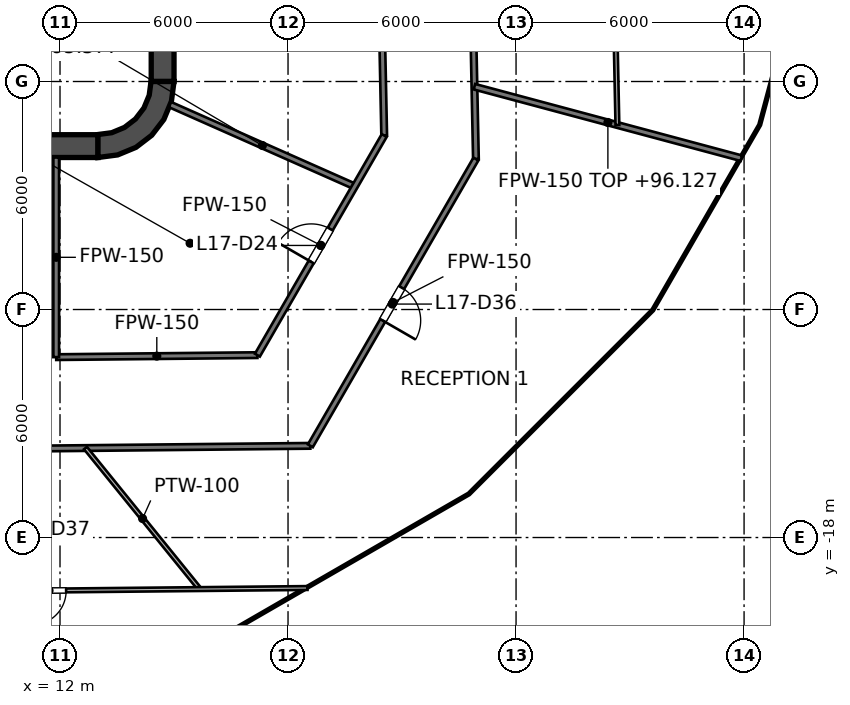
"""IFC4 building model, lengths in metres.
Left out: names, types, materials, properties, quantities, classifications, styles, units other than length and angle.
Written with IfcOpenShell. Run it as: python <this file> out.ifc"""

import sys

from ifc_helpers import new_model, si_unit, direction, frame, frame_2d, origin, place, context, subcontext, project, spatial, polyline, rectangle, outline, extrude, element, fill, save


model = new_model("IFC4")
c1 = context("Model", 3, precision=1e-05, world=origin(), true_north=direction((0.0, 1.0)))
c2 = subcontext(c1, "Body", "Model", "MODEL_VIEW")
j1 = project(units=[si_unit("LENGTHUNIT", "METRE"), si_unit("PLANEANGLEUNIT", "RADIAN")], contexts=[c1])
p1 = place(None, origin())
s1 = spatial("IfcSite", under=j1, at=p1, CompositionType="ELEMENT")
p2 = place(p1, origin())
s2 = spatial("IfcBuilding", under=s1, at=p2, CompositionType="ELEMENT")
p3 = place(p2, frame((0.0, 0.0, 92.4)))
s3 = spatial("IfcBuildingStorey", under=s2, at=p3, CompositionType="ELEMENT", Elevation=92.4)
p4 = place(p3, frame((-13.0, -7.7, 0.0), z_axis=(0.0, 0.0, 1.0), x_axis=(1.0, 0.0, 0.0)))
e1 = element("IfcWall", 1, at=p4, inside=s3, PredefinedType="SHEAR", context=c2, shape_type="SweptSolid", body=[
    extrude(rectangle(XDim=26.0, YDim=0.6, at=frame_2d((13.0, 0.0))), origin(), (0.0, 0.0, 1.0), 4.2),
])
p5 = place(p4, frame((1.7, 0.0, 0.0)))
e2 = element("IfcOpeningElement", 2, at=p5, cuts=e1, PredefinedType="OPENING", context=c2, shape_type="SweptSolid", body=[
    extrude(rectangle(XDim=1.8, YDim=2.1, at=frame_2d((0.9, 1.05))), frame((0.0, 0.3, 0.0), z_axis=(0.0, -1.0, 0.0), x_axis=(1.0, 0.0, 0.0)), (0.0, 0.0, 1.0), 0.6),
])
p6 = place(p4, frame((22.5, 0.0, 0.0)))
e3 = element("IfcOpeningElement", 3, at=p6, cuts=e1, PredefinedType="OPENING", context=c2, shape_type="SweptSolid", body=[
    extrude(rectangle(XDim=1.8, YDim=2.1, at=frame_2d((0.9, 1.05))), frame((0.0, 0.3, 0.0), z_axis=(0.0, -1.0, 0.0), x_axis=(1.0, 0.0, 0.0)), (0.0, 0.0, 1.0), 0.6),
])
p7 = place(p3, frame((14.7, -6.0, 0.0), z_axis=(0.0, 0.0, 1.0), x_axis=(0.0, 1.0, 0.0)))
e4 = element("IfcWall", 4, at=p7, inside=s3, PredefinedType="SHEAR", context=c2, shape_type="SweptSolid", body=[
    extrude(rectangle(XDim=12.0, YDim=0.6, at=frame_2d((6.0, 0.0))), origin(), (0.0, 0.0, 1.0), 4.2),
])
p8 = place(p3, origin())
e5 = element("IfcWall", 5, at=p8, inside=s3, PredefinedType="SHEAR", context=c2, shape_type="SweptSolid", body=[
    extrude(outline(polyline([(15.0, -6.0), (14.395, -6.0), (14.347, -6.361), (14.208, -6.698), (13.986, -6.986), (13.698, -7.208), (13.361, -7.347), (13.0, -7.395), (13.0, -8.0), (13.518, -7.932), (14.0, -7.732), (14.414, -7.414), (14.732, -7.0), (14.932, -6.518), (15.0, -6.0)])), origin(), (0.0, 0.0, 1.0), 4.2),
])
p9 = place(p3, frame((11.8, -7.4, 0.0), z_axis=(0.0, 0.0, 1.0), x_axis=(0.0, 1.0, 0.0)))
e6 = element("IfcWall", 6, at=p9, inside=s3, PredefinedType="SOLIDWALL", context=c2, shape_type="SweptSolid", body=[
    extrude(rectangle(XDim=14.8, YDim=0.4, at=frame_2d((7.4, 0.0))), origin(), (0.0, 0.0, 1.0), 3.9),
])
p10 = place(p9, frame((11.2, 0.0, 0.0)))
e7 = element("IfcOpeningElement", 7, at=p10, cuts=e6, PredefinedType="OPENING", context=c2, shape_type="SweptSolid", body=[
    extrude(rectangle(XDim=1.1, YDim=2.1, at=frame_2d((0.55, 1.05))), frame((0.0, 0.2, 0.0), z_axis=(0.0, -1.0, 0.0), x_axis=(1.0, 0.0, 0.0)), (0.0, 0.0, 1.0), 0.4),
])
p11 = place(p9, frame((8.3, 0.0, 0.0)))
e8 = element("IfcOpeningElement", 8, at=p11, cuts=e6, PredefinedType="OPENING", context=c2, shape_type="SweptSolid", body=[
    extrude(rectangle(XDim=1.1, YDim=2.1, at=frame_2d((0.55, 1.05))), frame((0.0, 0.2, 0.0), z_axis=(0.0, -1.0, 0.0), x_axis=(1.0, 0.0, 0.0)), (0.0, 0.0, 1.0), 0.4),
])
p12 = place(p9, frame((5.4, 0.0, 0.0)))
e9 = element("IfcOpeningElement", 9, at=p12, cuts=e6, PredefinedType="OPENING", context=c2, shape_type="SweptSolid", body=[
    extrude(rectangle(XDim=1.1, YDim=2.1, at=frame_2d((0.55, 1.05))), frame((0.0, 0.2, 0.0), z_axis=(0.0, -1.0, 0.0), x_axis=(1.0, 0.0, 0.0)), (0.0, 0.0, 1.0), 0.4),
])
p13 = place(p9, frame((13.552, 0.0, 0.0)))
e10 = element("IfcOpeningElement", 10, at=p13, cuts=e6, PredefinedType="OPENING", context=c2, shape_type="SweptSolid", body=[
    extrude(rectangle(XDim=0.9, YDim=2.1, at=frame_2d((0.45, 1.05))), frame((0.0, 0.2, 0.0), z_axis=(0.0, -1.0, 0.0), x_axis=(1.0, 0.0, 0.0)), (0.0, 0.0, 1.0), 0.4),
])
p14 = place(p9, frame((0.347, 0.0, 0.0)))
e11 = element("IfcOpeningElement", 11, at=p14, cuts=e6, PredefinedType="OPENING", context=c2, shape_type="SweptSolid", body=[
    extrude(rectangle(XDim=0.9, YDim=2.1, at=frame_2d((0.45, 1.05))), frame((0.0, 0.2, 0.0), z_axis=(0.0, -1.0, 0.0), x_axis=(1.0, 0.0, 0.0)), (0.0, 0.0, 1.0), 0.4),
])
e12 = element("IfcWall", 12, at=p8, inside=s3, PredefinedType="SOLIDWALL", context=c2, shape_type="SweptSolid", body=[
    extrude(outline(polyline([(12.0, -5.675), (12.0, -5.925), (14.15, -5.925), (14.4, -5.925), (14.4, -5.675), (14.4, -3.025), (14.4, -2.775), (14.4, -0.125), (14.4, 0.125), (14.4, 2.775), (14.4, 3.025), (14.4, 5.675), (14.4, 5.925), (14.15, 5.925), (12.0, 5.925), (12.0, 5.675), (14.15, 5.675), (14.15, 3.025), (12.0, 3.025), (12.0, 2.775), (14.15, 2.775), (14.15, 0.125), (12.0, 0.125), (12.0, -0.125), (14.15, -0.125), (14.15, -2.775), (12.0, -2.775), (12.0, -3.025), (14.15, -3.025), (14.15, -5.675), (12.0, -5.675)])), origin(), (0.0, 0.0, 1.0), 3.9),
])
p15 = place(p3, frame((20.167, 10.213, 0.0), z_axis=(0.0, 0.0, 1.0), x_axis=(0.020610894613, -0.999787572949, 0.0)))
e13 = element("IfcWall", 13, at=p15, inside=s3, PredefinedType="PARTITIONING", context=c2, shape_type="SweptSolid", body=[
    extrude(rectangle(XDim=17.637, YDim=0.15, at=frame_2d((8.819, 0.0))), origin(), (0.0, 0.0, 1.0), 2.968),
])
p16 = place(p15, frame((10.508, 0.0, 0.0)))
e14 = element("IfcOpeningElement", 14, at=p16, cuts=e13, PredefinedType="OPENING", context=c2, shape_type="SweptSolid", body=[
    extrude(rectangle(XDim=1.0, YDim=2.1, at=frame_2d((0.5, 1.05))), frame((0.0, 0.075, 0.0), z_axis=(0.0, -1.0, 0.0), x_axis=(1.0, 0.0, 0.0)), (0.0, 0.0, 1.0), 0.15),
])
p17 = place(p15, frame((5.09, 0.0, 0.0)))
e15 = element("IfcOpeningElement", 15, at=p17, cuts=e13, PredefinedType="OPENING", context=c2, shape_type="SweptSolid", body=[
    extrude(rectangle(XDim=1.0, YDim=2.1, at=frame_2d((0.5, 1.05))), frame((0.0, 0.075, 0.0), z_axis=(0.0, -1.0, 0.0), x_axis=(1.0, 0.0, 0.0)), (0.0, 0.0, 1.0), 0.15),
])
p18 = place(p3, frame((22.539, 11.615, 0.0), z_axis=(0.0, 0.0, 1.0), x_axis=(0.020601506683, -0.99978776644, 0.0)))
e16 = element("IfcWall", 16, at=p18, inside=s3, PredefinedType="PARTITIONING", context=c2, shape_type="SweptSolid", body=[
    extrude(rectangle(XDim=19.66, YDim=0.15, at=frame_2d((9.83, 0.0))), origin(), (0.0, 0.0, 1.0), 2.968),
])
p19 = place(p18, frame((13.54, 0.0, 0.0)))
e17 = element("IfcOpeningElement", 17, at=p19, cuts=e16, PredefinedType="OPENING", context=c2, shape_type="SweptSolid", body=[
    extrude(rectangle(XDim=1.0, YDim=2.1, at=frame_2d((0.5, 1.05))), frame((0.0, 0.075, 0.0), z_axis=(0.0, -1.0, 0.0), x_axis=(1.0, 0.0, 0.0)), (0.0, 0.0, 1.0), 0.15),
])
p20 = place(p18, frame((9.23, 0.0, 0.0)))
e18 = element("IfcOpeningElement", 18, at=p20, cuts=e16, PredefinedType="OPENING", context=c2, shape_type="SweptSolid", body=[
    extrude(rectangle(XDim=1.0, YDim=2.1, at=frame_2d((0.5, 1.05))), frame((0.0, 0.075, 0.0), z_axis=(0.0, -1.0, 0.0), x_axis=(1.0, 0.0, 0.0)), (0.0, 0.0, 1.0), 0.15),
])
p21 = place(p3, frame((14.895, -6.607, 0.0), z_axis=(0.0, 0.0, 1.0), x_axis=(0.914233271379, -0.405188259337, 0.0)))
e19 = element("IfcWall", 19, at=p21, inside=s3, PredefinedType="PARTITIONING", context=c2, shape_type="SweptSolid", body=[
    extrude(rectangle(XDim=5.317, YDim=0.15, at=frame_2d((2.659, 0.0))), origin(), (0.0, 0.0, 1.0), 2.977),
])
p22 = place(p3, frame((22.905, -6.137, 0.0), z_axis=(0.0, 0.0, 1.0), x_axis=(0.965915974273, -0.258855810529, 0.0)))
e20 = element("IfcWall", 20, at=p22, inside=s3, PredefinedType="PARTITIONING", context=c2, shape_type="SweptSolid", body=[
    extrude(rectangle(XDim=7.271, YDim=0.15, at=frame_2d((3.635, 0.0))), origin(), (0.0, 0.0, 1.0), 3.727),
])
p23 = place(p3, frame((-14.534, -15.916, 0.0), z_axis=(0.0, 0.0, 1.0), x_axis=(0.999950930262, 0.009906415532, 0.0)))
e21 = element("IfcWall", 21, at=p23, inside=s3, PredefinedType="PARTITIONING", context=c2, shape_type="SweptSolid", body=[
    extrude(rectangle(XDim=33.123, YDim=0.15, at=frame_2d((16.561, 0.0))), origin(), (0.0, 0.0, 1.0), 2.968),
])
p24 = place(p23, frame((22.477, 0.0, 0.0)))
e22 = element("IfcOpeningElement", 22, at=p24, cuts=e21, PredefinedType="OPENING", context=c2, shape_type="SweptSolid", body=[
    extrude(rectangle(XDim=1.0, YDim=2.1, at=frame_2d((0.5, 1.05))), frame((0.0, 0.075, 0.0), z_axis=(0.0, -1.0, 0.0), x_axis=(1.0, 0.0, 0.0)), (0.0, 0.0, 1.0), 0.15),
])
p25 = place(p23, frame((7.723, 0.0, 0.0)))
e23 = element("IfcOpeningElement", 23, at=p25, cuts=e21, PredefinedType="OPENING", context=c2, shape_type="SweptSolid", body=[
    extrude(rectangle(XDim=1.0, YDim=2.1, at=frame_2d((0.5, 1.05))), frame((0.0, 0.075, 0.0), z_axis=(0.0, -1.0, 0.0), x_axis=(1.0, 0.0, 0.0)), (0.0, 0.0, 1.0), 0.15),
])
p26 = place(p23, frame((16.111, 0.0, 0.0)))
e24 = element("IfcOpeningElement", 24, at=p26, cuts=e21, PredefinedType="OPENING", context=c2, shape_type="SweptSolid", body=[
    extrude(rectangle(XDim=1.0, YDim=2.1, at=frame_2d((0.5, 1.05))), frame((0.0, 0.075, 0.0), z_axis=(0.0, -1.0, 0.0), x_axis=(1.0, 0.0, 0.0)), (0.0, 0.0, 1.0), 0.15),
])
p27 = place(p3, frame((11.9, -13.253, 0.0), z_axis=(0.0, 0.0, 1.0), x_axis=(0.999950853109, 0.009914200296, 0.0)))
e25 = element("IfcWall", 25, at=p27, inside=s3, PredefinedType="PARTITIONING", context=c2, shape_type="SweptSolid", body=[
    extrude(rectangle(XDim=5.294, YDim=0.15, at=frame_2d((2.647, 0.0))), origin(), (0.0, 0.0, 1.0), 2.968),
])
p28 = place(p3, frame((18.587, -15.587, 0.0), z_axis=(0.0, 0.0, 1.0), x_axis=(0.500026433136, 0.866010142069, 0.0)))
e26 = element("IfcWall", 26, at=p28, inside=s3, PredefinedType="PARTITIONING", context=c2, shape_type="SweptSolid", body=[
    extrude(rectangle(XDim=8.713, YDim=0.15, at=frame_2d((4.357, 0.0))), origin(), (0.0, 0.0, 1.0), 2.968),
])
p29 = place(p28, frame((3.807, 0.0, 0.0)))
e27 = element("IfcOpeningElement", 27, at=p29, cuts=e26, PredefinedType="OPENING", context=c2, shape_type="SweptSolid", body=[
    extrude(rectangle(XDim=1.0, YDim=2.1, at=frame_2d((0.5, 1.05))), frame((0.0, 0.075, 0.0), z_axis=(0.0, -1.0, 0.0), x_axis=(1.0, 0.0, 0.0)), (0.0, 0.0, 1.0), 0.15),
])
p30 = place(p3, frame((17.194, -13.201, 0.0), z_axis=(0.0, 0.0, 1.0), x_axis=(0.50001062018, 0.866019272134, 0.0)))
e28 = element("IfcWall", 28, at=p30, inside=s3, PredefinedType="PARTITIONING", context=c2, shape_type="SweptSolid", body=[
    extrude(rectangle(XDim=6.674, YDim=0.15, at=frame_2d((3.337, 0.0))), origin(), (0.0, 0.0, 1.0), 2.968),
])
p31 = place(p30, frame((2.833, 0.0, 0.0)))
e29 = element("IfcOpeningElement", 29, at=p31, cuts=e28, PredefinedType="OPENING", context=c2, shape_type="SweptSolid", body=[
    extrude(rectangle(XDim=1.0, YDim=2.1, at=frame_2d((0.5, 1.05))), frame((0.0, 0.075, 0.0), z_axis=(0.0, -1.0, 0.0), x_axis=(1.0, 0.0, 0.0)), (0.0, 0.0, 1.0), 0.15),
])
p32 = place(p3, frame((11.9, -13.253, 0.0), z_axis=(0.0, 0.0, 1.0), x_axis=(0.0, 1.0, 0.0)))
e30 = element("IfcWall", 30, at=p32, inside=s3, PredefinedType="PARTITIONING", context=c2, shape_type="SweptSolid", body=[
    extrude(rectangle(XDim=5.253, YDim=0.15, at=frame_2d((2.626, 0.0))), origin(), (0.0, 0.0, 1.0), 2.968),
])
p33 = place(p3, frame((26.243, 13.397, 0.0), z_axis=(0.0, 0.0, 1.0), x_axis=(0.020639766813, -0.999786977324, 0.0)))
e31 = element("IfcWall", 31, at=p33, inside=s3, PredefinedType="PARTITIONING", context=c2, shape_type="SweptSolid", body=[
    extrude(rectangle(XDim=20.546, YDim=0.1, at=frame_2d((10.273, 0.0))), origin(), (0.0, 0.0, 1.0), 2.968),
])
p34 = place(p33, frame((5.506, 0.0, 0.0)))
e32 = element("IfcOpeningElement", 32, at=p34, cuts=e31, PredefinedType="OPENING", context=c2, shape_type="SweptSolid", body=[
    extrude(rectangle(XDim=0.9, YDim=2.1, at=frame_2d((0.45, 1.05))), frame((0.0, 0.05, 0.0), z_axis=(0.0, -1.0, 0.0), x_axis=(1.0, 0.0, 0.0)), (0.0, 0.0, 1.0), 0.1),
])
p35 = place(p3, frame((12.67, -15.646, 0.0), z_axis=(0.0, 0.0, 1.0), x_axis=(0.629429152062, -0.777057875923, 0.0)))
e33 = element("IfcWall", 33, at=p35, inside=s3, PredefinedType="PARTITIONING", context=c2, shape_type="SweptSolid", body=[
    extrude(rectangle(XDim=4.774, YDim=0.1, at=frame_2d((2.387, 0.0))), origin(), (0.0, 0.0, 1.0), 3.9),
])
p36 = place(p3, frame((-15.26, -19.663, 0.0), z_axis=(0.0, 0.0, 1.0), x_axis=(0.999951032014, 0.009896139397, 0.0)))
e34 = element("IfcWall", 34, at=p36, inside=s3, PredefinedType="PARTITIONING", context=c2, shape_type="SweptSolid", body=[
    extrude(rectangle(XDim=33.774, YDim=0.1, at=frame_2d((16.887, 0.0))), origin(), (0.0, 0.0, 1.0), 2.968),
])
p37 = place(p36, frame((26.523, 0.0, 0.0)))
e35 = element("IfcOpeningElement", 35, at=p37, cuts=e34, PredefinedType="OPENING", context=c2, shape_type="SweptSolid", body=[
    extrude(rectangle(XDim=0.9, YDim=2.1, at=frame_2d((0.45, 1.05))), frame((0.0, 0.05, 0.0), z_axis=(0.0, -1.0, 0.0), x_axis=(1.0, 0.0, 0.0)), (0.0, 0.0, 1.0), 0.1),
])
p38 = place(p36, frame((2.43, 0.0, 0.0)))
e36 = element("IfcOpeningElement", 36, at=p38, cuts=e34, PredefinedType="OPENING", context=c2, shape_type="SweptSolid", body=[
    extrude(rectangle(XDim=0.9, YDim=2.1, at=frame_2d((0.45, 1.05))), frame((0.0, 0.05, 0.0), z_axis=(0.0, -1.0, 0.0), x_axis=(1.0, 0.0, 0.0)), (0.0, 0.0, 1.0), 0.1),
])
p39 = place(p36, frame((15.34, 0.0, 0.0)))
e37 = element("IfcOpeningElement", 37, at=p39, cuts=e34, PredefinedType="OPENING", context=c2, shape_type="SweptSolid", body=[
    extrude(rectangle(XDim=0.9, YDim=2.1, at=frame_2d((0.45, 1.05))), frame((0.0, 0.05, 0.0), z_axis=(0.0, -1.0, 0.0), x_axis=(1.0, 0.0, 0.0)), (0.0, 0.0, 1.0), 0.1),
])
p40 = place(p14, origin())
e38 = element("IfcDoor", 38, at=p40, inside=s3, OperationType="SINGLE_SWING_RIGHT", PredefinedType="DOOR", context=c2, shape_type="SweptSolid", body=[
    extrude(rectangle(XDim=0.9, YDim=2.1, at=frame_2d((0.45, 1.05))), frame((0.0, 0.025, 0.0), z_axis=(0.0, -1.0, 0.0), x_axis=(1.0, 0.0, 0.0)), (0.0, 0.0, 1.0), 0.05),
])
fill(e11, e38)
p41 = place(p31, origin())
e39 = element("IfcDoor", 39, at=p41, inside=s3, OperationType="SINGLE_SWING_LEFT", PredefinedType="DOOR", context=c2, shape_type="SweptSolid", body=[
    extrude(rectangle(XDim=1.0, YDim=2.1, at=frame_2d((0.5, 1.05))), frame((0.0, 0.025, 0.0), z_axis=(0.0, -1.0, 0.0), x_axis=(1.0, 0.0, 0.0)), (0.0, 0.0, 1.0), 0.05),
])
fill(e29, e39)
p42 = place(p29, origin())
e40 = element("IfcDoor", 40, at=p42, inside=s3, OperationType="SINGLE_SWING_LEFT", PredefinedType="DOOR", context=c2, shape_type="SweptSolid", body=[
    extrude(rectangle(XDim=1.0, YDim=2.1, at=frame_2d((0.5, 1.05))), frame((0.0, 0.025, 0.0), z_axis=(0.0, -1.0, 0.0), x_axis=(1.0, 0.0, 0.0)), (0.0, 0.0, 1.0), 0.05),
])
fill(e27, e40)
p43 = place(p37, origin())
e41 = element("IfcDoor", 41, at=p43, inside=s3, OperationType="SINGLE_SWING_LEFT", PredefinedType="DOOR", context=c2, shape_type="SweptSolid", body=[
    extrude(rectangle(XDim=0.9, YDim=2.1, at=frame_2d((0.45, 1.05))), frame((0.0, 0.025, 0.0), z_axis=(0.0, -1.0, 0.0), x_axis=(1.0, 0.0, 0.0)), (0.0, 0.0, 1.0), 0.05),
])
fill(e35, e41)
save(model, sys.argv[1])
